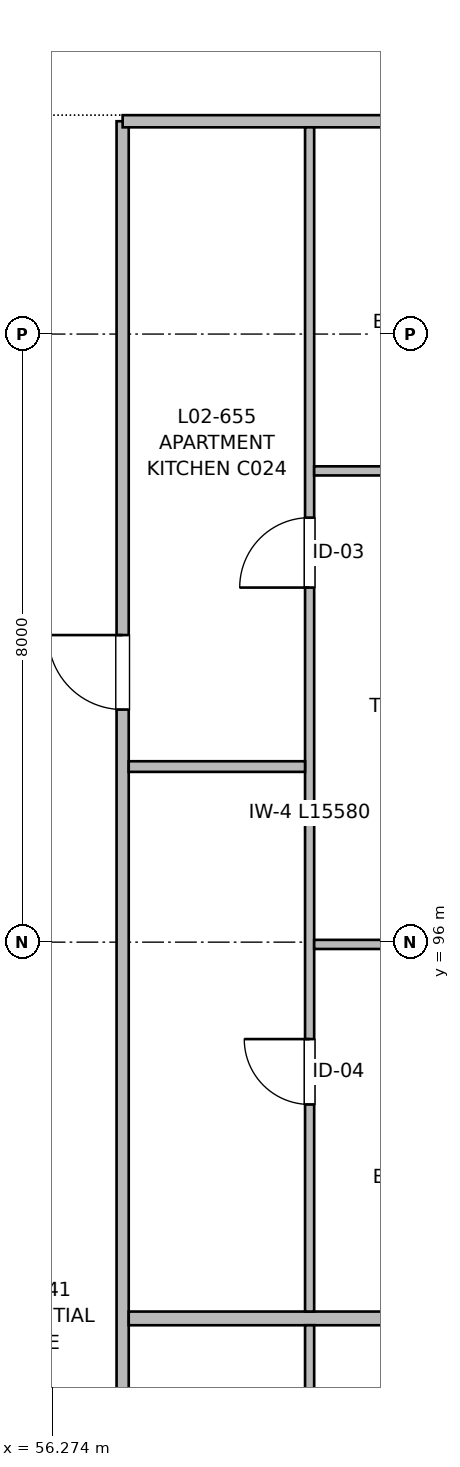
"""IFC4 building model, lengths in metres.
Left out: names, types, materials, properties, quantities, classifications, styles, units other than length and angle.
Written with IfcOpenShell. Run it as: python <this file> out.ifc"""

import sys

from ifc_helpers import new_model, si_unit, direction, frame, frame_2d, origin, place, context, subcontext, project, spatial, rectangle, extrude, element, fill, save


model = new_model("IFC4")
c1 = context("Model", 3, precision=1e-05, world=origin(), true_north=direction((0.0, 1.0)))
c2 = subcontext(c1, "Body", "Model", "MODEL_VIEW")
j1 = project(units=[si_unit("LENGTHUNIT", "METRE"), si_unit("PLANEANGLEUNIT", "RADIAN")], contexts=[c1])
p1 = place(None, origin())
s1 = spatial("IfcSite", under=j1, at=p1, CompositionType="ELEMENT")
p2 = place(p1, origin())
s2 = spatial("IfcBuilding", under=s1, at=p2, CompositionType="ELEMENT")
p3 = place(p2, frame((0.0, 0.0, 7.36)))
s3 = spatial("IfcBuildingStorey", under=s2, at=p3, CompositionType="ELEMENT", Elevation=7.36)
p4 = place(p3, frame((57.2, 56.18, 0.0), z_axis=(0.0, 0.0, 1.0), x_axis=(0.0, 1.0, 0.0)))
e1 = element("IfcWall", 1, at=p4, inside=s3, PredefinedType="PARTITIONING", context=c2, shape_type="SweptSolid", body=[
    extrude(rectangle(XDim=50.62, YDim=0.16, at=frame_2d((25.31, 0.0))), origin(), (0.0, 0.0, 1.0), 2.935),
])
p5 = place(p4, frame((4.51, 0.0, 0.0)))
e2 = element("IfcOpeningElement", 2, at=p5, cuts=e1, PredefinedType="OPENING", context=c2, shape_type="SweptSolid", body=[
    extrude(rectangle(XDim=1.5, YDim=2.2, at=frame_2d((0.75, 1.1))), frame((0.0, 0.09, 0.0), z_axis=(0.0, -1.0, 0.0), x_axis=(1.0, 0.0, 0.0)), (0.0, 0.0, 1.0), 0.18),
])
p6 = place(p4, frame((16.48, 0.0, 0.0)))
e3 = element("IfcOpeningElement", 3, at=p6, cuts=e1, PredefinedType="OPENING", context=c2, shape_type="SweptSolid", body=[
    extrude(rectangle(XDim=0.98, YDim=2.15, at=frame_2d((0.49, 1.075))), frame((0.0, 0.09, 0.0), z_axis=(0.0, -1.0, 0.0), x_axis=(1.0, 0.0, 0.0)), (0.0, 0.0, 1.0), 0.18),
])
p7 = place(p4, frame((28.53, 0.0, 0.0)))
e4 = element("IfcOpeningElement", 4, at=p7, cuts=e1, PredefinedType="OPENING", context=c2, shape_type="SweptSolid", body=[
    extrude(rectangle(XDim=0.98, YDim=2.15, at=frame_2d((0.49, 1.075))), frame((0.0, 0.09, 0.0), z_axis=(0.0, -1.0, 0.0), x_axis=(1.0, 0.0, 0.0)), (0.0, 0.0, 1.0), 0.18),
])
p8 = place(p4, frame((42.88, 0.0, 0.0)))
e5 = element("IfcOpeningElement", 5, at=p8, cuts=e1, PredefinedType="OPENING", context=c2, shape_type="SweptSolid", body=[
    extrude(rectangle(XDim=0.98, YDim=2.15, at=frame_2d((0.49, 1.075))), frame((0.0, 0.09, 0.0), z_axis=(0.0, -1.0, 0.0), x_axis=(1.0, 0.0, 0.0)), (0.0, 0.0, 1.0), 0.18),
])
p9 = place(p3, frame((57.2, 106.8, 0.0), z_axis=(0.0, 0.0, 1.0), x_axis=(1.0, 0.0, 0.0)))
e6 = element("IfcWall", 6, at=p9, inside=s3, PredefinedType="PARTITIONING", context=c2, shape_type="SweptSolid", body=[
    extrude(rectangle(XDim=24.12, YDim=0.16, at=frame_2d((12.06, 0.0))), origin(), (0.0, 0.0, 1.0), 2.935),
])
p10 = place(p9, frame((19.575, 0.0, 0.0)))
e7 = element("IfcOpeningElement", 7, at=p10, cuts=e6, PredefinedType="OPENING", context=c2, shape_type="SweptSolid", body=[
    extrude(rectangle(XDim=1.05, YDim=2.15, at=frame_2d((0.525, 1.075))), frame((0.0, 0.09, 0.0), z_axis=(0.0, -1.0, 0.0), x_axis=(1.0, 0.0, 0.0)), (0.0, 0.0, 1.0), 0.18),
])
p11 = place(p9, frame((8.995, 0.0, 0.0)))
e8 = element("IfcOpeningElement", 8, at=p11, cuts=e6, PredefinedType="OPENING", context=c2, shape_type="SweptSolid", body=[
    extrude(rectangle(XDim=0.98, YDim=2.15, at=frame_2d((0.49, 1.075))), frame((0.0, 0.09, 0.0), z_axis=(0.0, -1.0, 0.0), x_axis=(1.0, 0.0, 0.0)), (0.0, 0.0, 1.0), 0.18),
])
p12 = place(p3, frame((57.28, 91.05, 0.0), z_axis=(0.0, 0.0, 1.0), x_axis=(1.0, 0.0, 0.0)))
e9 = element("IfcWall", 9, at=p12, inside=s3, PredefinedType="PARTITIONING", context=c2, shape_type="SweptSolid", body=[
    extrude(rectangle(XDim=9.115, YDim=0.18, at=frame_2d((4.558, 0.0))), origin(), (0.0, 0.0, 1.0), 2.935),
])
p13 = place(p3, frame((59.66, 78.0, 0.0), z_axis=(0.0, 0.0, 1.0), x_axis=(0.0, 1.0, 0.0)))
e10 = element("IfcWall", 10, at=p13, inside=s3, PredefinedType="PARTITIONING", context=c2, shape_type="SweptSolid", body=[
    extrude(rectangle(XDim=12.96, YDim=0.12, at=frame_2d((6.48, 0.0))), origin(), (0.0, 0.0, 1.0), 2.935),
])
p14 = place(p13, frame((2.265, 0.0, 0.0)))
e11 = element("IfcOpeningElement", 11, at=p14, cuts=e10, PredefinedType="OPENING", context=c2, shape_type="SweptSolid", body=[
    extrude(rectangle(XDim=0.86, YDim=2.1, at=frame_2d((0.43, 1.05))), frame((0.0, 0.07, 0.0), z_axis=(0.0, -1.0, 0.0), x_axis=(1.0, 0.0, 0.0)), (0.0, 0.0, 1.0), 0.14),
])
p15 = place(p13, frame((7.92, 0.0, 0.0)))
e12 = element("IfcOpeningElement", 12, at=p15, cuts=e10, PredefinedType="OPENING", context=c2, shape_type="SweptSolid", body=[
    extrude(rectangle(XDim=0.92, YDim=2.1, at=frame_2d((0.46, 1.05))), frame((0.0, 0.07, 0.0), z_axis=(0.0, -1.0, 0.0), x_axis=(1.0, 0.0, 0.0)), (0.0, 0.0, 1.0), 0.14),
])
p16 = place(p3, frame((59.66, 91.14, 0.0), z_axis=(0.0, 0.0, 1.0), x_axis=(0.0, 1.0, 0.0)))
e13 = element("IfcWall", 13, at=p16, inside=s3, PredefinedType="PARTITIONING", context=c2, shape_type="SweptSolid", body=[
    extrude(rectangle(XDim=15.58, YDim=0.12, at=frame_2d((7.79, 0.0))), origin(), (0.0, 0.0, 1.0), 2.935),
])
p17 = place(p16, frame((2.725, 0.0, 0.0)))
e14 = element("IfcOpeningElement", 14, at=p17, cuts=e13, PredefinedType="OPENING", context=c2, shape_type="SweptSolid", body=[
    extrude(rectangle(XDim=0.86, YDim=2.1, at=frame_2d((0.43, 1.05))), frame((0.0, 0.07, 0.0), z_axis=(0.0, -1.0, 0.0), x_axis=(1.0, 0.0, 0.0)), (0.0, 0.0, 1.0), 0.14),
])
p18 = place(p16, frame((9.525, 0.0, 0.0)))
e15 = element("IfcOpeningElement", 15, at=p18, cuts=e13, PredefinedType="OPENING", context=c2, shape_type="SweptSolid", body=[
    extrude(rectangle(XDim=0.92, YDim=2.1, at=frame_2d((0.46, 1.05))), frame((0.0, 0.07, 0.0), z_axis=(0.0, -1.0, 0.0), x_axis=(1.0, 0.0, 0.0)), (0.0, 0.0, 1.0), 0.14),
])
p19 = place(p3, frame((57.28, 98.31, 0.0), z_axis=(0.0, 0.0, 1.0), x_axis=(1.0, 0.0, 0.0)))
e16 = element("IfcWall", 16, at=p19, inside=s3, PredefinedType="PARTITIONING", context=c2, shape_type="SweptSolid", body=[
    extrude(rectangle(XDim=2.32, YDim=0.14, at=frame_2d((1.16, 0.0))), origin(), (0.0, 0.0, 1.0), 2.935),
])
p20 = place(p3, frame((59.72, 95.97, 0.0), z_axis=(0.0, 0.0, 1.0), x_axis=(1.0, 0.0, 0.0)))
e17 = element("IfcWall", 17, at=p20, inside=s3, PredefinedType="PARTITIONING", context=c2, shape_type="SweptSolid", body=[
    extrude(rectangle(XDim=11.317, YDim=0.12, at=frame_2d((5.659, 0.0))), origin(), (0.0, 0.0, 1.0), 2.53),
])
p21 = place(p20, frame((1.645, 0.0, 0.0)))
e18 = element("IfcOpeningElement", 18, at=p21, cuts=e17, PredefinedType="OPENING", context=c2, shape_type="SweptSolid", body=[
    extrude(rectangle(XDim=0.9, YDim=2.1, at=frame_2d((0.45, 1.05))), frame((0.0, 0.07, 0.0), z_axis=(0.0, -1.0, 0.0), x_axis=(1.0, 0.0, 0.0)), (0.0, 0.0, 1.0), 0.14),
])
p22 = place(p3, frame((59.72, 102.2, 0.0), z_axis=(0.0, 0.0, 1.0), x_axis=(1.0, 0.0, 0.0)))
e19 = element("IfcWall", 19, at=p22, inside=s3, PredefinedType="PARTITIONING", context=c2, shape_type="SweptSolid", body=[
    extrude(rectangle(XDim=4.19, YDim=0.12, at=frame_2d((2.095, 0.0))), origin(), (0.0, 0.0, 1.0), 2.935),
])
p23 = place(p22, frame((1.655, 0.0, 0.0)))
e20 = element("IfcOpeningElement", 20, at=p23, cuts=e19, PredefinedType="OPENING", context=c2, shape_type="SweptSolid", body=[
    extrude(rectangle(XDim=0.88, YDim=2.1, at=frame_2d((0.44, 1.05))), frame((0.0, 0.07, 0.0), z_axis=(0.0, -1.0, 0.0), x_axis=(1.0, 0.0, 0.0)), (0.0, 0.0, 1.0), 0.14),
])
p24 = place(p17, origin())
e21 = element("IfcDoor", 21, at=p24, inside=s3, OperationType="SINGLE_SWING_RIGHT", PredefinedType="DOOR", context=c2, shape_type="SweptSolid", body=[
    extrude(rectangle(XDim=0.86, YDim=2.1, at=frame_2d((0.43, 1.05))), frame((0.0, 0.025, 0.0), z_axis=(0.0, -1.0, 0.0), x_axis=(1.0, 0.0, 0.0)), (0.0, 0.0, 1.0), 0.05),
])
fill(e14, e21)
p25 = place(p18, origin())
e22 = element("IfcDoor", 22, at=p25, inside=s3, OperationType="SINGLE_SWING_LEFT", PredefinedType="DOOR", context=c2, shape_type="SweptSolid", body=[
    extrude(rectangle(XDim=0.92, YDim=2.1, at=frame_2d((0.46, 1.05))), frame((0.0, 0.025, 0.0), z_axis=(0.0, -1.0, 0.0), x_axis=(1.0, 0.0, 0.0)), (0.0, 0.0, 1.0), 0.05),
])
fill(e15, e22)
p26 = place(p8, origin())
e23 = element("IfcDoor", 23, at=p26, inside=s3, OperationType="SINGLE_SWING_RIGHT", PredefinedType="DOOR", context=c2, shape_type="SweptSolid", body=[
    extrude(rectangle(XDim=0.98, YDim=2.15, at=frame_2d((0.49, 1.075))), frame((0.0, 0.025, 0.0), z_axis=(0.0, -1.0, 0.0), x_axis=(1.0, 0.0, 0.0)), (0.0, 0.0, 1.0), 0.05),
])
fill(e5, e23)
save(model, sys.argv[1])
